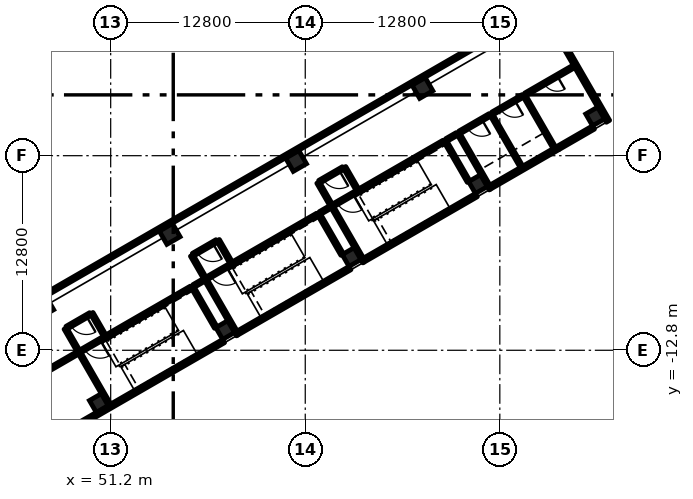
"""IFC4 building model, lengths in metres.
Left out: names, types, materials, properties, quantities, classifications, styles, units other than length and angle.
Written with IfcOpenShell. Run it as: python <this file> out.ifc"""

import sys

from ifc_helpers import new_model, si_unit, direction, frame, frame_2d, origin, origin_2d, place, context, subcontext, project, spatial, rectangle, extrude, element, fill, save


model = new_model("IFC4")
c1 = context("Model", 3, precision=1e-05, world=origin(), true_north=direction((0.0, 1.0)))
c2 = subcontext(c1, "Body", "Model", "MODEL_VIEW")
j1 = project(units=[si_unit("LENGTHUNIT", "METRE"), si_unit("PLANEANGLEUNIT", "RADIAN")], contexts=[c1])
p1 = place(None, origin())
s1 = spatial("IfcSite", under=j1, at=p1, CompositionType="ELEMENT")
p2 = place(p1, origin())
s2 = spatial("IfcBuilding", under=s1, at=p2, CompositionType="ELEMENT")
p3 = place(p2, frame((0.0, 0.0, 16.2)))
s3 = spatial("IfcBuildingStorey", under=s2, at=p3, CompositionType="ELEMENT", Elevation=16.2)
for number, where, z_axis, x_axis in (
    (1, (50.418, -16.271, 0.0), (0.0, 0.0, 1.0), (-0.5, 0.866, 0.0)),
    (2, (58.732, -11.471, 0.0), (0.0, 0.0, 1.0), (-0.5, 0.866, 0.0)),
    (3, (67.046, -6.671, 0.0), (0.0, 0.0, 1.0), (-0.5, 0.866, 0.0)),
    (4, (75.36, -1.871, 0.0), (0.0, 0.0, 1.0), (-0.5, 0.866, 0.0)),
    (5, (83.067, 2.579, 0.0), (0.0, 0.0, 1.0), (-0.5, 0.866, 0.0)),
):
    element("IfcColumn", number, at=place(p3, frame(where, z_axis=z_axis, x_axis=x_axis)), inside=s3, PredefinedType="COLUMN", context=c2, shape_type="SweptSolid", body=[
        extrude(rectangle(XDim=0.9, YDim=0.9, at=origin_2d()), origin(), (0.0, 0.0, 1.0), 5.4),
    ])
for number, where, z_axis, x_axis in (
    (6, (46.768, -9.949, 0.0), (0.0, 0.0, 1.0), (-0.5, 0.866, 0.0)),
    (7, (55.082, -5.149, 0.0), (0.0, 0.0, 1.0), (-0.5, 0.866, 0.0)),
    (8, (63.396, -0.349, 0.0), (0.0, 0.0, 1.0), (-0.5, 0.866, 0.0)),
    (9, (71.71, 4.451, 0.0), (0.0, 0.0, 1.0), (-0.5, 0.866, 0.0)),
):
    element("IfcColumn", number, at=place(p3, frame(where, z_axis=z_axis, x_axis=x_axis)), inside=s3, PredefinedType="COLUMN", context=c2, shape_type="SweptSolid", body=[
        extrude(rectangle(XDim=1.0, YDim=1.0, at=origin_2d()), origin(), (0.0, 0.0, 1.0), 5.4),
    ])
p4 = place(p3, frame((79.603, 9.73, 0.0), z_axis=(0.0, 0.0, 1.0), x_axis=(0.499999331568, -0.866025789703, 0.0)))
e10 = element("IfcWall", 10, at=p4, inside=s3, PredefinedType="SOLIDWALL", context=c2, shape_type="SweptSolid", body=[
    extrude(rectangle(XDim=8.625, YDim=0.25, at=frame_2d((4.312, 0.0))), origin(), (0.0, 0.0, 1.0), 5.0),
])
p5 = place(p3, frame((58.63, -12.194, 0.0), z_axis=(0.0, 0.0, 1.0), x_axis=(-0.866027159341, -0.499996959274, 0.0)))
e11 = element("IfcWall", 11, at=p5, inside=s3, PredefinedType="SOLIDWALL", context=c2, shape_type="SweptSolid", body=[
    extrude(rectangle(XDim=11.625, YDim=0.25, at=frame_2d((5.812, 0.0))), origin(), (0.0, 0.0, 1.0), 5.0),
])
p6 = place(p3, frame((66.944, -7.394, 0.0), z_axis=(0.0, 0.0, 1.0), x_axis=(-0.866033360935, -0.499986217557, 0.0)))
e12 = element("IfcWall", 12, at=p6, inside=s3, PredefinedType="SOLIDWALL", context=c2, shape_type="SweptSolid", body=[
    extrude(rectangle(XDim=8.6, YDim=0.25, at=frame_2d((4.3, 0.0))), origin(), (0.0, 0.0, 1.0), 5.0),
])
p7 = place(p3, frame((75.258, -2.594, 0.0), z_axis=(0.0, 0.0, 1.0), x_axis=(-0.866028165386, -0.499995216735, 0.0)))
e13 = element("IfcWall", 13, at=p7, inside=s3, PredefinedType="SOLIDWALL", context=c2, shape_type="SweptSolid", body=[
    extrude(rectangle(XDim=8.6, YDim=0.25, at=frame_2d((4.3, 0.0))), origin(), (0.0, 0.0, 1.0), 5.0),
])
p8 = place(p3, frame((80.627, 0.506, 0.0), z_axis=(0.0, 0.0, 1.0), x_axis=(-0.866009661879, -0.500027264788, 0.0)))
e14 = element("IfcWall", 14, at=p8, inside=s3, PredefinedType="SOLIDWALL", context=c2, shape_type="SweptSolid", body=[
    extrude(rectangle(XDim=5.2, YDim=0.25, at=frame_2d((2.6, 0.0))), origin(), (0.0, 0.0, 1.0), 5.0),
])
p9 = place(p3, frame((82.965, 1.856, 0.0), z_axis=(0.0, 0.0, 1.0), x_axis=(-0.866059108428, -0.4999416173, 0.0)))
e15 = element("IfcWall", 15, at=p9, inside=s3, PredefinedType="SOLIDWALL", context=c2, shape_type="SweptSolid", body=[
    extrude(rectangle(XDim=2.7, YDim=0.25, at=frame_2d((1.35, 0.0))), origin(), (0.0, 0.0, 1.0), 5.0),
])
p10 = place(p9, frame((0.45, 0.0, 0.9)))
e16 = element("IfcOpeningElement", 16, at=p10, cuts=e15, PredefinedType="OPENING", context=c2, shape_type="SweptSolid", body=[
    extrude(rectangle(XDim=2.0, YDim=1.8, at=frame_2d((1.0, 0.9))), frame((0.0, 0.135, 0.0), z_axis=(0.0, -1.0, 0.0), x_axis=(1.0, 0.0, 0.0)), (0.0, 0.0, 1.0), 0.27),
])
p11 = place(p3, frame((59.496, -11.694, 0.0), z_axis=(0.0, 0.0, 1.0), x_axis=(-0.865982457891, -0.500074377092, 0.0)))
e17 = element("IfcWall", 17, at=p11, inside=s3, PredefinedType="SOLIDWALL", context=c2, shape_type="SweptSolid", body=[
    extrude(rectangle(XDim=0.1, YDim=0.25, at=frame_2d((0.05, 0.0))), origin(), (0.0, 0.0, 1.0), 5.0),
])
p12 = place(p3, frame((67.81, -6.894, 0.0), z_axis=(0.0, 0.0, 1.0), x_axis=(-0.867038199201, -0.4982416694, 0.0)))
e18 = element("IfcWall", 18, at=p12, inside=s3, PredefinedType="SOLIDWALL", context=c2, shape_type="SweptSolid", body=[
    extrude(rectangle(XDim=0.1, YDim=0.25, at=frame_2d((0.05, 0.0))), origin(), (0.0, 0.0, 1.0), 5.0),
])
p13 = place(p3, frame((76.124, -2.094, 0.0), z_axis=(0.0, 0.0, 1.0), x_axis=(-0.865982457891, -0.500074377092, 0.0)))
e19 = element("IfcWall", 19, at=p13, inside=s3, PredefinedType="SOLIDWALL", context=c2, shape_type="SweptSolid", body=[
    extrude(rectangle(XDim=0.1, YDim=0.25, at=frame_2d((0.05, 0.0))), origin(), (0.0, 0.0, 1.0), 5.0),
])
p14 = place(p3, frame((51.119, -16.385, 0.0), z_axis=(0.0, 0.0, 1.0), x_axis=(-0.49999894854, 0.866026010844, 0.0)))
e20 = element("IfcWall", 20, at=p14, inside=s3, PredefinedType="SOLIDWALL", context=c2, shape_type="SweptSolid", body=[
    extrude(rectangle(XDim=4.0, YDim=0.2, at=frame_2d((2.0, 0.0))), origin(), (0.0, 0.0, 1.0), 5.0),
])
p15 = place(p3, frame((58.117, -11.306, 0.0), z_axis=(0.0, 0.0, 1.0), x_axis=(-0.499933790963, 0.866063626216, 0.0)))
e21 = element("IfcWall", 21, at=p15, inside=s3, PredefinedType="SOLIDWALL", context=c2, shape_type="SweptSolid", body=[
    extrude(rectangle(XDim=3.1, YDim=0.2, at=frame_2d((1.55, 0.0))), origin(), (0.0, 0.0, 1.0), 5.0),
])
p16 = place(p3, frame((59.433, -11.585, 0.0), z_axis=(0.0, 0.0, 1.0), x_axis=(-0.49999894854, 0.866026010844, 0.0)))
e22 = element("IfcWall", 22, at=p16, inside=s3, PredefinedType="SOLIDWALL", context=c2, shape_type="SweptSolid", body=[
    extrude(rectangle(XDim=4.0, YDim=0.2, at=frame_2d((2.0, 0.0))), origin(), (0.0, 0.0, 1.0), 5.0),
])
p17 = place(p3, frame((66.431, -6.506, 0.0), z_axis=(0.0, 0.0, 1.0), x_axis=(-0.49999285859, 0.86602952684, 0.0)))
e23 = element("IfcWall", 23, at=p17, inside=s3, PredefinedType="SOLIDWALL", context=c2, shape_type="SweptSolid", body=[
    extrude(rectangle(XDim=3.1, YDim=0.2, at=frame_2d((1.55, 0.0))), origin(), (0.0, 0.0, 1.0), 5.0),
])
p18 = place(p3, frame((67.747, -6.785, 0.0), z_axis=(0.0, 0.0, 1.0), x_axis=(-0.49999894854, 0.866026010844, 0.0)))
e24 = element("IfcWall", 24, at=p18, inside=s3, PredefinedType="SOLIDWALL", context=c2, shape_type="SweptSolid", body=[
    extrude(rectangle(XDim=4.0, YDim=0.2, at=frame_2d((2.0, 0.0))), origin(), (0.0, 0.0, 1.0), 5.0),
])
p19 = place(p3, frame((74.745, -1.706, 0.0), z_axis=(0.0, 0.0, 1.0), x_axis=(-0.500026960575, 0.86600983753, 0.0)))
e25 = element("IfcWall", 25, at=p19, inside=s3, PredefinedType="SOLIDWALL", context=c2, shape_type="SweptSolid", body=[
    extrude(rectangle(XDim=3.1, YDim=0.2, at=frame_2d((1.55, 0.0))), origin(), (0.0, 0.0, 1.0), 5.0),
])
p20 = place(p3, frame((50.722, -11.996, 0.0), z_axis=(0.0, 0.0, 1.0), x_axis=(-0.866036909293, -0.499980071345, 0.0)))
e26 = element("IfcWall", 26, at=p20, inside=s3, PredefinedType="SOLIDWALL", context=c2, shape_type="SweptSolid", body=[
    extrude(rectangle(XDim=1.75, YDim=0.2, at=frame_2d((0.875, 0.0))), origin(), (0.0, 0.0, 1.0), 5.0),
])
p21 = place(p20, frame((0.25, 0.0, 0.0)))
e27 = element("IfcOpeningElement", 27, at=p21, cuts=e26, PredefinedType="OPENING", context=c2, shape_type="SweptSolid", body=[
    extrude(rectangle(XDim=1.2, YDim=2.1, at=frame_2d((0.6, 1.05))), frame((0.0, 0.11, 0.0), z_axis=(0.0, -1.0, 0.0), x_axis=(1.0, 0.0, 0.0)), (0.0, 0.0, 1.0), 0.22),
])
p22 = place(p3, frame((50.722, -11.996, 0.0), z_axis=(0.0, 0.0, 1.0), x_axis=(0.866027239912, 0.49999681972, 0.0)))
e28 = element("IfcWall", 28, at=p22, inside=s3, PredefinedType="SOLIDWALL", context=c2, shape_type="SweptSolid", body=[
    extrude(rectangle(XDim=6.65, YDim=0.2, at=frame_2d((3.325, 0.0))), origin(), (0.0, 0.0, 1.0), 5.0),
])
p23 = place(p3, frame((59.035, -7.196, 0.0), z_axis=(0.0, 0.0, 1.0), x_axis=(-0.866002029911, -0.500040482552, 0.0)))
e29 = element("IfcWall", 29, at=p23, inside=s3, PredefinedType="SOLIDWALL", context=c2, shape_type="SweptSolid", body=[
    extrude(rectangle(XDim=1.75, YDim=0.2, at=frame_2d((0.875, 0.0))), origin(), (0.0, 0.0, 1.0), 5.0),
])
p24 = place(p23, frame((0.25, 0.0, 0.0)))
e30 = element("IfcOpeningElement", 30, at=p24, cuts=e29, PredefinedType="OPENING", context=c2, shape_type="SweptSolid", body=[
    extrude(rectangle(XDim=1.2, YDim=2.1, at=frame_2d((0.6, 1.05))), frame((0.0, 0.11, 0.0), z_axis=(0.0, -1.0, 0.0), x_axis=(1.0, 0.0, 0.0)), (0.0, 0.0, 1.0), 0.22),
])
p25 = place(p3, frame((59.035, -7.196, 0.0), z_axis=(0.0, 0.0, 1.0), x_axis=(0.866027239912, 0.49999681972, 0.0)))
e31 = element("IfcWall", 31, at=p25, inside=s3, PredefinedType="SOLIDWALL", context=c2, shape_type="SweptSolid", body=[
    extrude(rectangle(XDim=6.65, YDim=0.2, at=frame_2d((3.325, 0.0))), origin(), (0.0, 0.0, 1.0), 5.0),
])
p26 = place(p3, frame((67.349, -2.396, 0.0), z_axis=(0.0, 0.0, 1.0), x_axis=(-0.866036909293, -0.499980071345, 0.0)))
e32 = element("IfcWall", 32, at=p26, inside=s3, PredefinedType="SOLIDWALL", context=c2, shape_type="SweptSolid", body=[
    extrude(rectangle(XDim=1.75, YDim=0.2, at=frame_2d((0.875, 0.0))), origin(), (0.0, 0.0, 1.0), 5.0),
])
p27 = place(p26, frame((0.25, 0.0, 0.0)))
e33 = element("IfcOpeningElement", 33, at=p27, cuts=e32, PredefinedType="OPENING", context=c2, shape_type="SweptSolid", body=[
    extrude(rectangle(XDim=1.2, YDim=2.1, at=frame_2d((0.6, 1.05))), frame((0.0, 0.11, 0.0), z_axis=(0.0, -1.0, 0.0), x_axis=(1.0, 0.0, 0.0)), (0.0, 0.0, 1.0), 0.22),
])
p28 = place(p3, frame((67.349, -2.396, 0.0), z_axis=(0.0, 0.0, 1.0), x_axis=(0.86601134256, 0.500024353964, 0.0)))
e34 = element("IfcWall", 34, at=p28, inside=s3, PredefinedType="SOLIDWALL", context=c2, shape_type="SweptSolid", body=[
    extrude(rectangle(XDim=6.65, YDim=0.2, at=frame_2d((3.325, 0.0))), origin(), (0.0, 0.0, 1.0), 5.0),
])
for number, where, z_axis, x_axis in (
    (35, (76.061, -1.986, 0.0), (0.0, 0.0, 1.0), (-0.5, 0.866, 0.0)),
    (36, (78.226, -0.736, 0.0), (0.0, 0.0, 1.0), (-0.5, 0.866, 0.0)),
    (37, (80.391, 0.514, 0.0), (0.0, 0.0, 1.0), (-0.5, 0.866, 0.0)),
):
    element("IfcWall", number, at=place(p3, frame(where, z_axis=z_axis, x_axis=x_axis)), inside=s3, PredefinedType="SOLIDWALL", context=c2, shape_type="SweptSolid", body=[
        extrude(rectangle(XDim=4.0, YDim=0.2, at=frame_2d((2.0, 0.0))), origin(), (0.0, 0.0, 1.0), 5.0),
    ])
p29 = place(p3, frame((76.139, 2.679, 0.0), z_axis=(0.0, 0.0, 1.0), x_axis=(-0.865980515519, -0.500077740698, 0.0)))
e38 = element("IfcWall", 38, at=p29, inside=s3, PredefinedType="SOLIDWALL", context=c2, shape_type="SweptSolid", body=[
    extrude(rectangle(XDim=2.3, YDim=0.2, at=frame_2d((1.15, 0.0))), origin(), (0.0, 0.0, 1.0), 5.0),
])
p30 = place(p29, frame((0.6, 0.0, 0.0)))
e39 = element("IfcOpeningElement", 39, at=p30, cuts=e38, PredefinedType="OPENING", context=c2, shape_type="SweptSolid", body=[
    extrude(rectangle(XDim=1.1, YDim=2.1, at=frame_2d((0.55, 1.05))), frame((0.0, 0.11, 0.0), z_axis=(0.0, -1.0, 0.0), x_axis=(1.0, 0.0, 0.0)), (0.0, 0.0, 1.0), 0.22),
])
p31 = place(p3, frame((78.304, 3.929, 0.0), z_axis=(0.0, 0.0, 1.0), x_axis=(-0.865980515519, -0.500077740698, 0.0)))
e40 = element("IfcWall", 40, at=p31, inside=s3, PredefinedType="SOLIDWALL", context=c2, shape_type="SweptSolid", body=[
    extrude(rectangle(XDim=2.3, YDim=0.2, at=frame_2d((1.15, 0.0))), origin(), (0.0, 0.0, 1.0), 5.0),
])
p32 = place(p31, frame((0.6, 0.0, 0.0)))
e41 = element("IfcOpeningElement", 41, at=p32, cuts=e40, PredefinedType="OPENING", context=c2, shape_type="SweptSolid", body=[
    extrude(rectangle(XDim=1.1, YDim=2.1, at=frame_2d((0.55, 1.05))), frame((0.0, 0.11, 0.0), z_axis=(0.0, -1.0, 0.0), x_axis=(1.0, 0.0, 0.0)), (0.0, 0.0, 1.0), 0.22),
])
for number, where, z_axis, x_axis in (
    (42, (49.07, -12.835, 0.0), (0.0, 0.0, 1.0), (-0.5, 0.866, 0.0)),
    (43, (50.802, -11.835, 0.0), (0.0, 0.0, 1.0), (-0.5, 0.866, 0.0)),
):
    element("IfcWall", number, at=place(p3, frame(where, z_axis=z_axis, x_axis=x_axis)), inside=s3, PredefinedType="PARTITIONING", context=c2, shape_type="SweptSolid", body=[
        extrude(rectangle(XDim=1.7, YDim=0.2, at=frame_2d((0.85, 0.0))), origin(), (0.0, 0.0, 1.0), 4.1),
    ])
for number, where, z_axis, x_axis in (
    (44, (57.383, -8.035, 0.0), (0.0, 0.0, 1.0), (-0.5, 0.866, 0.0)),
    (45, (59.115, -7.035, 0.0), (0.0, 0.0, 1.0), (-0.5, 0.866, 0.0)),
):
    element("IfcWall", number, at=place(p3, frame(where, z_axis=z_axis, x_axis=x_axis)), inside=s3, PredefinedType="PARTITIONING", context=c2, shape_type="SweptSolid", body=[
        extrude(rectangle(XDim=1.7, YDim=0.2, at=frame_2d((0.85, 0.0))), origin(), (0.0, 0.0, 1.0), 4.1),
    ])
p33 = place(p3, frame((65.697, -3.235, 0.0), z_axis=(0.0, 0.0, 1.0), x_axis=(-0.499892348375, 0.866087547558, 0.0)))
e46 = element("IfcWall", 46, at=p33, inside=s3, PredefinedType="PARTITIONING", context=c2, shape_type="SweptSolid", body=[
    extrude(rectangle(XDim=1.7, YDim=0.2, at=frame_2d((0.85, 0.0))), origin(), (0.0, 0.0, 1.0), 4.1),
])
p34 = place(p3, frame((67.429, -2.235, 0.0), z_axis=(0.0, 0.0, 1.0), x_axis=(-0.500000056704, 0.866025371046, 0.0)))
e47 = element("IfcWall", 47, at=p34, inside=s3, PredefinedType="PARTITIONING", context=c2, shape_type="SweptSolid", body=[
    extrude(rectangle(XDim=1.7, YDim=0.2, at=frame_2d((0.85, 0.0))), origin(), (0.0, 0.0, 1.0), 4.1),
])
p35 = place(p3, frame((49.865, -10.413, 0.0), z_axis=(0.0, 0.0, 1.0), x_axis=(-0.866047807691, -0.499961193289, 0.0)))
e48 = element("IfcWall", 48, at=p35, inside=s3, PredefinedType="PARTITIONING", context=c2, shape_type="SweptSolid", body=[
    extrude(rectangle(XDim=1.8, YDim=0.2, at=frame_2d((0.9, 0.0))), origin(), (0.0, 0.0, 1.0), 4.1),
])
p36 = place(p35, frame((0.3, 0.0, 0.0)))
e49 = element("IfcOpeningElement", 49, at=p36, cuts=e48, PredefinedType="OPENING", context=c2, shape_type="SweptSolid", body=[
    extrude(rectangle(XDim=1.2, YDim=2.1, at=frame_2d((0.6, 1.05))), frame((0.0, 0.11, 0.0), z_axis=(0.0, -1.0, 0.0), x_axis=(1.0, 0.0, 0.0)), (0.0, 0.0, 1.0), 0.22),
])
p37 = place(p3, frame((58.179, -5.613, 0.0), z_axis=(0.0, 0.0, 1.0), x_axis=(-0.866047807691, -0.499961193289, 0.0)))
e50 = element("IfcWall", 50, at=p37, inside=s3, PredefinedType="PARTITIONING", context=c2, shape_type="SweptSolid", body=[
    extrude(rectangle(XDim=1.8, YDim=0.2, at=frame_2d((0.9, 0.0))), origin(), (0.0, 0.0, 1.0), 4.1),
])
p38 = place(p37, frame((0.3, 0.0, 0.0)))
e51 = element("IfcOpeningElement", 51, at=p38, cuts=e50, PredefinedType="OPENING", context=c2, shape_type="SweptSolid", body=[
    extrude(rectangle(XDim=1.2, YDim=2.1, at=frame_2d((0.6, 1.05))), frame((0.0, 0.11, 0.0), z_axis=(0.0, -1.0, 0.0), x_axis=(1.0, 0.0, 0.0)), (0.0, 0.0, 1.0), 0.22),
])
p39 = place(p3, frame((66.493, -0.812, 0.0), z_axis=(0.0, 0.0, 1.0), x_axis=(-0.866081705922, -0.499902469156, 0.0)))
e52 = element("IfcWall", 52, at=p39, inside=s3, PredefinedType="PARTITIONING", context=c2, shape_type="SweptSolid", body=[
    extrude(rectangle(XDim=1.8, YDim=0.2, at=frame_2d((0.9, 0.0))), origin(), (0.0, 0.0, 1.0), 4.1),
])
p40 = place(p39, frame((0.3, 0.0, 0.0)))
e53 = element("IfcOpeningElement", 53, at=p40, cuts=e52, PredefinedType="OPENING", context=c2, shape_type="SweptSolid", body=[
    extrude(rectangle(XDim=1.2, YDim=2.1, at=frame_2d((0.6, 1.05))), frame((0.0, 0.11, 0.0), z_axis=(0.0, -1.0, 0.0), x_axis=(1.0, 0.0, 0.0)), (0.0, 0.0, 1.0), 0.22),
])
p41 = place(p3, frame((46.5, -14.434, 0.0), z_axis=(0.0, 0.0, 1.0), x_axis=(0.866046596414, 0.499963291492, 0.0)))
e54 = element("IfcWall", 54, at=p41, inside=s3, PredefinedType="PARTITIONING", context=c2, shape_type="SweptSolid", body=[
    extrude(rectangle(XDim=2.925, YDim=0.2, at=frame_2d((1.462, 0.0))), origin(), (0.0, 0.0, 1.0), 4.1),
])
p42 = place(p3, frame((81.682, 5.879, 0.0), z_axis=(0.0, 0.0, 1.0), x_axis=(-0.866000971088, -0.500042316284, 0.0)))
e55 = element("IfcWall", 55, at=p42, inside=s3, PredefinedType="PARTITIONING", context=c2, shape_type="SweptSolid", body=[
    extrude(rectangle(XDim=3.7, YDim=0.2, at=frame_2d((1.85, 0.0))), origin(), (0.0, 0.0, 1.0), 4.1),
])
p43 = place(p42, frame((1.275, 0.0, 0.0)))
e56 = element("IfcOpeningElement", 56, at=p43, cuts=e55, PredefinedType="OPENING", context=c2, shape_type="SweptSolid", body=[
    extrude(rectangle(XDim=1.0, YDim=2.1, at=frame_2d((0.5, 1.05))), frame((0.0, 0.11, 0.0), z_axis=(0.0, -1.0, 0.0), x_axis=(1.0, 0.0, 0.0)), (0.0, 0.0, 1.0), 0.22),
])
p44 = place(p3, frame((56.654, -8.571, 0.0), z_axis=(0.0, 0.0, 1.0), x_axis=(0.866094119867, 0.499880961361, 0.0)))
e57 = element("IfcWall", 57, at=p44, inside=s3, PredefinedType="PARTITIONING", context=c2, shape_type="SweptSolid", body=[
    extrude(rectangle(XDim=0.8, YDim=0.2, at=frame_2d((0.4, 0.0))), origin(), (0.0, 0.0, 1.0), 4.1),
])
p45 = place(p3, frame((64.968, -3.771, 0.0), z_axis=(0.0, 0.0, 1.0), x_axis=(0.865885638426, 0.500242002602, 0.0)))
e58 = element("IfcWall", 58, at=p45, inside=s3, PredefinedType="PARTITIONING", context=c2, shape_type="SweptSolid", body=[
    extrude(rectangle(XDim=0.8, YDim=0.2, at=frame_2d((0.4, 0.0))), origin(), (0.0, 0.0, 1.0), 4.1),
])
p46 = place(p3, frame((73.281, 1.029, 0.0), z_axis=(0.0, 0.0, 1.0), x_axis=(0.865961984968, 0.500109828528, 0.0)))
e59 = element("IfcWall", 59, at=p46, inside=s3, PredefinedType="PARTITIONING", context=c2, shape_type="SweptSolid", body=[
    extrude(rectangle(XDim=0.8, YDim=0.2, at=frame_2d((0.4, 0.0))), origin(), (0.0, 0.0, 1.0), 4.1),
])
p47 = place(p3, frame((38.358, -14.083, 0.0), z_axis=(0.0, 0.0, 1.0), x_axis=(0.866024244032, 0.500002008745, 0.0)))
e60 = element("IfcWall", 60, at=p47, inside=s3, PredefinedType="PARTITIONING", context=c2, shape_type="SweptSolid", body=[
    extrude(rectangle(XDim=47.5, YDim=0.2, at=frame_2d((23.75, 0.0))), origin(), (0.0, 0.0, 1.0), 4.1),
])
p48 = place(p10, origin())
e61 = element("IfcWindow", 61, at=p48, inside=s3, PartitioningType="SINGLE_PANEL", PredefinedType="WINDOW", context=c2, shape_type="SweptSolid", body=[
    extrude(rectangle(XDim=2.0, YDim=1.8, at=frame_2d((1.0, 0.9))), frame((0.0, 0.03, 0.0), z_axis=(0.0, -1.0, 0.0), x_axis=(1.0, 0.0, 0.0)), (0.0, 0.0, 1.0), 0.06),
])
fill(e16, e61)
p49 = place(p21, origin())
e62 = element("IfcDoor", 62, at=p49, inside=s3, OperationType="SINGLE_SWING_LEFT", PredefinedType="DOOR", context=c2, shape_type="SweptSolid", body=[
    extrude(rectangle(XDim=1.2, YDim=2.1, at=frame_2d((0.6, 1.05))), frame((0.0, 0.025, 0.0), z_axis=(0.0, -1.0, 0.0), x_axis=(1.0, 0.0, 0.0)), (0.0, 0.0, 1.0), 0.05),
])
fill(e27, e62)
p50 = place(p24, origin())
e63 = element("IfcDoor", 63, at=p50, inside=s3, OperationType="SINGLE_SWING_LEFT", PredefinedType="DOOR", context=c2, shape_type="SweptSolid", body=[
    extrude(rectangle(XDim=1.2, YDim=2.1, at=frame_2d((0.6, 1.05))), frame((0.0, 0.025, 0.0), z_axis=(0.0, -1.0, 0.0), x_axis=(1.0, 0.0, 0.0)), (0.0, 0.0, 1.0), 0.05),
])
fill(e30, e63)
p51 = place(p27, origin())
e64 = element("IfcDoor", 64, at=p51, inside=s3, OperationType="SINGLE_SWING_LEFT", PredefinedType="DOOR", context=c2, shape_type="SweptSolid", body=[
    extrude(rectangle(XDim=1.2, YDim=2.1, at=frame_2d((0.6, 1.05))), frame((0.0, 0.025, 0.0), z_axis=(0.0, -1.0, 0.0), x_axis=(1.0, 0.0, 0.0)), (0.0, 0.0, 1.0), 0.05),
])
fill(e33, e64)
p52 = place(p30, origin())
e65 = element("IfcDoor", 65, at=p52, inside=s3, OperationType="DOUBLE_DOOR_SLIDING", PredefinedType="DOOR", context=c2, shape_type="SweptSolid", body=[
    extrude(rectangle(XDim=1.1, YDim=2.1, at=frame_2d((0.55, 1.05))), frame((0.0, 0.025, 0.0), z_axis=(0.0, -1.0, 0.0), x_axis=(1.0, 0.0, 0.0)), (0.0, 0.0, 1.0), 0.05),
])
fill(e39, e65)
p53 = place(p32, origin())
e66 = element("IfcDoor", 66, at=p53, inside=s3, OperationType="DOUBLE_DOOR_SLIDING", PredefinedType="DOOR", context=c2, shape_type="SweptSolid", body=[
    extrude(rectangle(XDim=1.1, YDim=2.1, at=frame_2d((0.55, 1.05))), frame((0.0, 0.025, 0.0), z_axis=(0.0, -1.0, 0.0), x_axis=(1.0, 0.0, 0.0)), (0.0, 0.0, 1.0), 0.05),
])
fill(e41, e66)
p54 = place(p36, origin())
e67 = element("IfcDoor", 67, at=p54, inside=s3, OperationType="SINGLE_SWING_LEFT", PredefinedType="DOOR", context=c2, shape_type="SweptSolid", body=[
    extrude(rectangle(XDim=1.2, YDim=2.1, at=frame_2d((0.6, 1.05))), frame((0.0, 0.025, 0.0), z_axis=(0.0, -1.0, 0.0), x_axis=(1.0, 0.0, 0.0)), (0.0, 0.0, 1.0), 0.05),
])
fill(e49, e67)
p55 = place(p38, origin())
e68 = element("IfcDoor", 68, at=p55, inside=s3, OperationType="SINGLE_SWING_LEFT", PredefinedType="DOOR", context=c2, shape_type="SweptSolid", body=[
    extrude(rectangle(XDim=1.2, YDim=2.1, at=frame_2d((0.6, 1.05))), frame((0.0, 0.025, 0.0), z_axis=(0.0, -1.0, 0.0), x_axis=(1.0, 0.0, 0.0)), (0.0, 0.0, 1.0), 0.05),
])
fill(e51, e68)
p56 = place(p40, origin())
e69 = element("IfcDoor", 69, at=p56, inside=s3, OperationType="SINGLE_SWING_LEFT", PredefinedType="DOOR", context=c2, shape_type="SweptSolid", body=[
    extrude(rectangle(XDim=1.2, YDim=2.1, at=frame_2d((0.6, 1.05))), frame((0.0, 0.025, 0.0), z_axis=(0.0, -1.0, 0.0), x_axis=(1.0, 0.0, 0.0)), (0.0, 0.0, 1.0), 0.05),
])
fill(e53, e69)
p57 = place(p43, origin())
e70 = element("IfcDoor", 70, at=p57, inside=s3, OperationType="SINGLE_SWING_LEFT", PredefinedType="DOOR", context=c2, shape_type="SweptSolid", body=[
    extrude(rectangle(XDim=1.0, YDim=2.1, at=frame_2d((0.5, 1.05))), frame((0.0, 0.025, 0.0), z_axis=(0.0, -1.0, 0.0), x_axis=(1.0, 0.0, 0.0)), (0.0, 0.0, 1.0), 0.05),
])
fill(e56, e70)
save(model, sys.argv[1])
